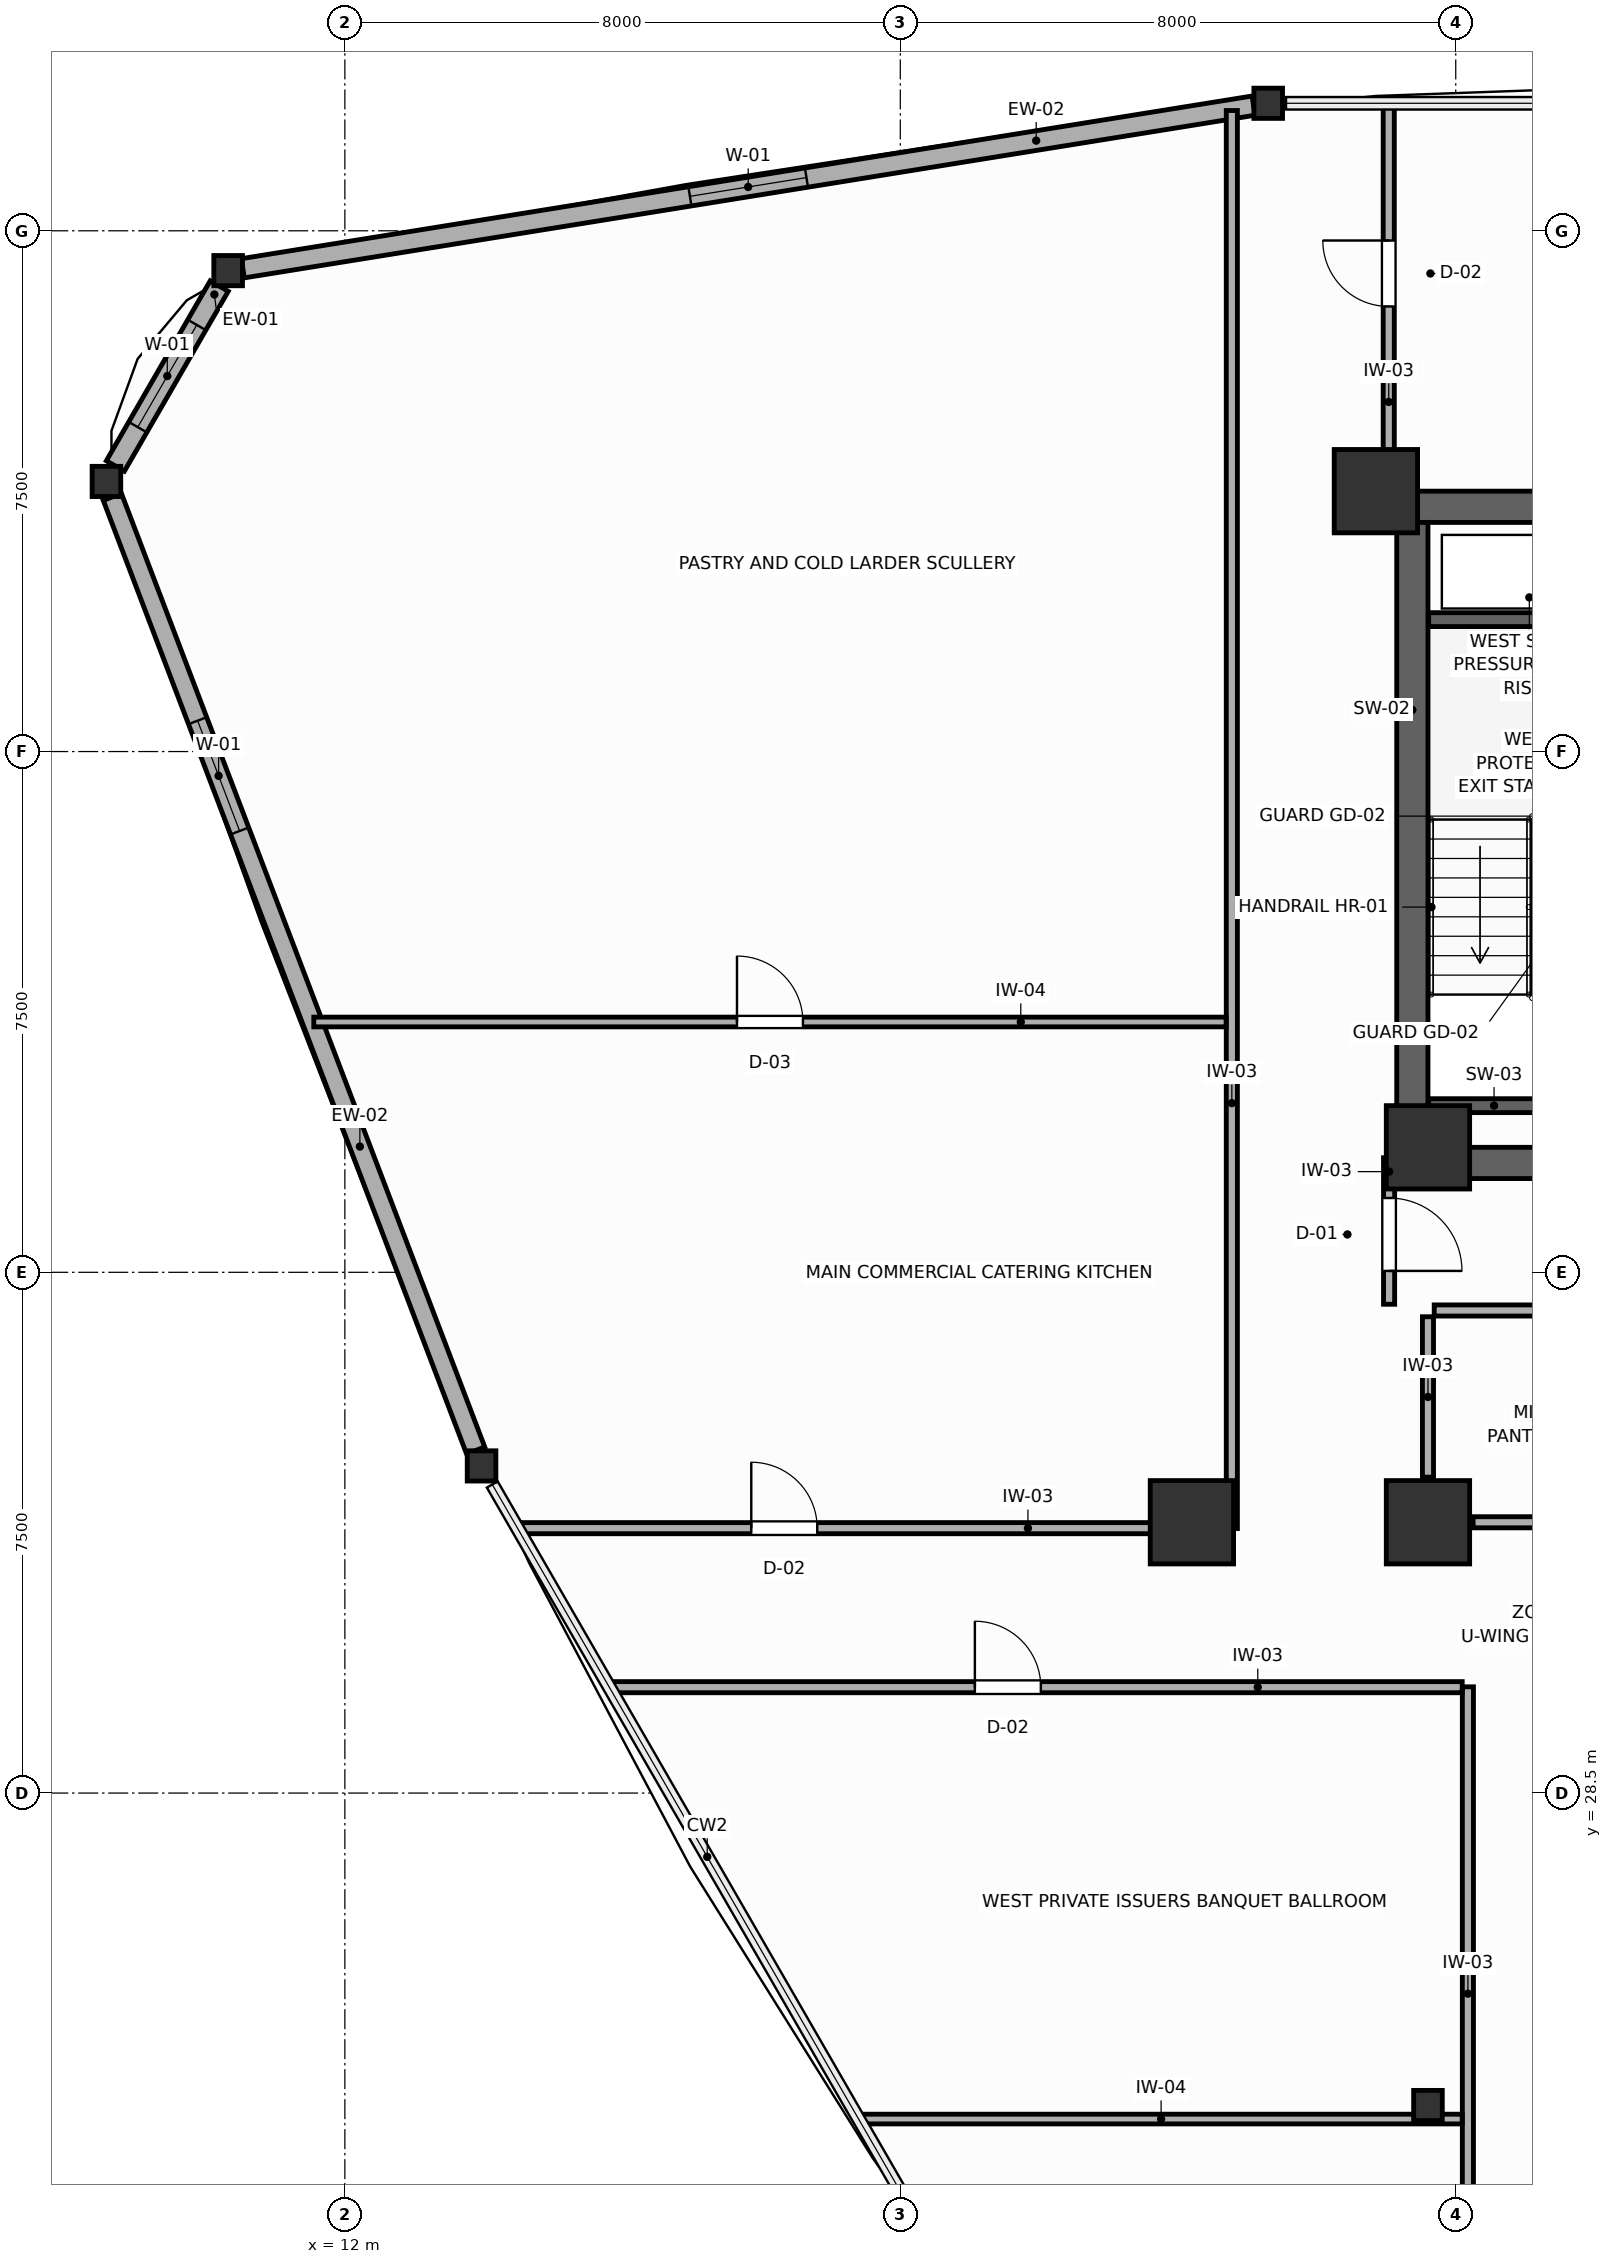
"""IFC4 building model, lengths in metres.
Left out: names, types, materials, properties, quantities, classifications, styles, units other than length and angle.
Written with IfcOpenShell. Run it as: python <this file> out.ifc"""

import sys

from ifc_helpers import new_model, si_unit, direction, frame, frame_2d, origin, origin_2d, place, context, subcontext, project, spatial, rectangle, i_section, extrude, source, transform, mapped, element, fill, save


model = new_model("IFC4")
c1 = context("Model", 3, precision=1e-05, world=origin(), true_north=direction((0.0, 1.0)))
c2 = subcontext(c1, "Body", "Model", "MODEL_VIEW")
j1 = project(units=[si_unit("LENGTHUNIT", "METRE"), si_unit("PLANEANGLEUNIT", "RADIAN")], contexts=[c1])
p1 = place(None, origin())
s1 = spatial("IfcSite", under=j1, at=p1, CompositionType="ELEMENT")
p2 = place(p1, origin())
s2 = spatial("IfcBuilding", under=s1, at=p2, CompositionType="ELEMENT")
p3 = place(p2, frame((0.0, 0.0, 150.6)))
s3 = spatial("IfcBuildingStorey", under=s2, at=p3, CompositionType="ELEMENT", Elevation=150.6)
p4 = place(p3, frame((27.15, 47.025, 0.0), z_axis=(0.0, 0.0, 1.0), x_axis=(1.0, 0.0, 0.0)))
e1 = element("IfcWall", 1, at=p4, inside=s3, PredefinedType="SHEAR", context=c2, shape_type="SweptSolid", body=[
    extrude(rectangle(XDim=17.7, YDim=0.45, at=frame_2d((8.85, 0.0))), origin(), (0.0, 0.0, 1.0), 3.6),
])
p5 = place(p3, frame((27.15, 37.575, 0.0), z_axis=(0.0, 0.0, 1.0), x_axis=(1.0, 0.0, 0.0)))
e2 = element("IfcWall", 2, at=p5, inside=s3, PredefinedType="SHEAR", context=c2, shape_type="SweptSolid", body=[
    extrude(rectangle(XDim=17.7, YDim=0.45, at=frame_2d((8.85, 0.0))), origin(), (0.0, 0.0, 1.0), 3.6),
])
p6 = place(p5, frame((4.875, 0.0, 0.0)))
e3 = element("IfcOpeningElement", 3, at=p6, cuts=e2, PredefinedType="OPENING", context=c2, shape_type="SweptSolid", body=[
    extrude(rectangle(XDim=1.05, YDim=2.1, at=frame_2d((0.525, 1.05))), frame((0.0, 0.235, 0.0), z_axis=(0.0, -1.0, 0.0), x_axis=(1.0, 0.0, 0.0)), (0.0, 0.0, 1.0), 0.47),
])
p7 = place(p5, frame((11.775, 0.0, 0.0)))
e4 = element("IfcOpeningElement", 4, at=p7, cuts=e2, PredefinedType="OPENING", context=c2, shape_type="SweptSolid", body=[
    extrude(rectangle(XDim=1.05, YDim=2.1, at=frame_2d((0.525, 1.05))), frame((0.0, 0.235, 0.0), z_axis=(0.0, -1.0, 0.0), x_axis=(1.0, 0.0, 0.0)), (0.0, 0.0, 1.0), 0.47),
])
p8 = place(p3, frame((27.375, 37.8, 0.0), z_axis=(0.0, 0.0, 1.0), x_axis=(0.0, 1.0, 0.0)))
e5 = element("IfcWall", 5, at=p8, inside=s3, PredefinedType="SHEAR", context=c2, shape_type="SweptSolid", body=[
    extrude(rectangle(XDim=9.0, YDim=0.45, at=frame_2d((4.5, 0.0))), origin(), (0.0, 0.0, 1.0), 3.6),
])
m1 = source(origin(), c2, "Body", "SweptSolid", [
    extrude(rectangle(XDim=1.2, YDim=1.2, at=origin_2d()), origin(), (0.0, 0.0, 1.0), 3.6),
])
for number, where, z_axis, x_axis in (
    (6, (26.85, 47.25, 0.0), (0.0, 0.0, 1.0), (1.0, 0.0, 0.0)),
    (7, (27.6, 37.8, 0.0), (0.0, 0.0, 1.0), (1.0, 0.0, 0.0)),
    (8, (27.6, 32.4, 0.0), (0.0, 0.0, 1.0), (1.0, 0.0, 0.0)),
    (9, (24.2, 32.4, 0.0), (0.0, 0.0, 1.0), (1.0, 0.0, 0.0)),
):
    element("IfcColumn", number, at=place(p3, frame(where, z_axis=z_axis, x_axis=x_axis)), inside=s3, PredefinedType="COLUMN", context=c2, shape_type="MappedRepresentation", body=[
        mapped(m1, transform((0.0, 0.0, 0.0), scale=1.0)),
    ])
m2 = source(origin(), c2, "Body", "SweptSolid", [
    extrude(i_section(OverallWidth=0.412, OverallDepth=0.435, WebThickness=0.033, FlangeThickness=0.053, FilletRadius=0.015, at=origin_2d()), origin(), (0.0, 0.0, 1.0), 3.6),
])
for number, where, z_axis, x_axis in (
    (10, (27.6, 24.0, 0.0), (0.0, 0.0, 1.0), (1.0, 0.0, 0.0)),
    (11, (25.299, 52.836, 0.0), (0.0, 0.0, 1.0), (1.0, 0.0, 0.0)),
    (12, (10.319, 50.426, 0.0), (0.0, 0.0, 1.0), (1.0, 0.0, 0.0)),
    (13, (8.566, 47.39, 0.0), (0.0, 0.0, 1.0), (1.0, 0.0, 0.0)),
    (14, (13.969, 33.212, 0.0), (0.0, 0.0, 1.0), (1.0, 0.0, 0.0)),
):
    element("IfcColumn", number, at=place(p3, frame(where, z_axis=z_axis, x_axis=x_axis)), inside=s3, PredefinedType="COLUMN", context=c2, shape_type="MappedRepresentation", body=[
        mapped(m2, transform((0.0, 0.0, 0.0), scale=1.0)),
    ])
p9 = place(p3, frame((25.088, 52.802, 0.0), z_axis=(0.0, 0.0, 1.0), x_axis=(-0.987303259595, -0.158846698404, 0.0)))
e15 = element("IfcWall", 15, at=p9, inside=s3, PredefinedType="SOLIDWALL", context=c2, shape_type="SweptSolid", body=[
    extrude(rectangle(XDim=14.746, YDim=0.28, at=frame_2d((7.373, 0.0))), origin(), (0.0, 0.0, 1.0), 2.95),
])
p10 = place(p9, frame((6.523, 0.0, 0.75)))
e16 = element("IfcOpeningElement", 16, at=p10, cuts=e15, PredefinedType="OPENING", context=c2, shape_type="SweptSolid", body=[
    extrude(rectangle(XDim=1.7, YDim=1.75, at=frame_2d((0.85, 0.875))), frame((0.0, 0.15, 0.0), z_axis=(0.0, -1.0, 0.0), x_axis=(1.0, 0.0, 0.0)), (0.0, 0.0, 1.0), 0.3),
])
p11 = place(p3, frame((10.19, 50.204, 0.0), z_axis=(0.0, 0.0, 1.0), x_axis=(-0.499974392705, -0.866040187658, 0.0)))
e17 = element("IfcWall", 17, at=p11, inside=s3, PredefinedType="SOLIDWALL", context=c2, shape_type="SweptSolid", body=[
    extrude(rectangle(XDim=2.992, YDim=0.3, at=frame_2d((1.496, 0.0))), origin(), (0.0, 0.0, 1.0), 3.0),
])
p12 = place(p11, frame((0.646, 0.0, 0.75)))
e18 = element("IfcOpeningElement", 18, at=p12, cuts=e17, PredefinedType="OPENING", context=c2, shape_type="SweptSolid", body=[
    extrude(rectangle(XDim=1.7, YDim=1.75, at=frame_2d((0.85, 0.875))), frame((0.0, 0.16, 0.0), z_axis=(0.0, -1.0, 0.0), x_axis=(1.0, 0.0, 0.0)), (0.0, 0.0, 1.0), 0.32),
])
p13 = place(p3, frame((8.651, 47.167, 0.0), z_axis=(0.0, 0.0, 1.0), x_axis=(0.356077530784, -0.934456415287, 0.0)))
e19 = element("IfcWall", 19, at=p13, inside=s3, PredefinedType="SOLIDWALL", context=c2, shape_type="SweptSolid", body=[
    extrude(rectangle(XDim=14.697, YDim=0.28, at=frame_2d((7.348, 0.0))), origin(), (0.0, 0.0, 1.0), 2.95),
])
p14 = place(p13, frame((3.449, 0.0, 0.75)))
e20 = element("IfcOpeningElement", 20, at=p14, cuts=e19, PredefinedType="OPENING", context=c2, shape_type="SweptSolid", body=[
    extrude(rectangle(XDim=1.7, YDim=1.75, at=frame_2d((0.85, 0.875))), frame((0.0, 0.15, 0.0), z_axis=(0.0, -1.0, 0.0), x_axis=(1.0, 0.0, 0.0)), (0.0, 0.0, 1.0), 0.3),
])
for number, where, z_axis, x_axis in (
    (21, (27.61, 45.4, 0.0), (0.0, 0.0, 1.0), (1.0, 0.0, 0.0)),
    (22, (27.61, 38.4, 0.0), (0.0, 0.0, 1.0), (1.0, 0.0, 0.0)),
):
    element("IfcWall", number, at=place(p3, frame(where, z_axis=z_axis, x_axis=x_axis)), inside=s3, PredefinedType="SHEAR", context=c2, shape_type="SweptSolid", body=[
        extrude(rectangle(XDim=3.14, YDim=0.2, at=frame_2d((1.57, 0.0))), origin(), (0.0, 0.0, 1.0), 3.6),
    ])
p15 = place(p3, frame((28.25, 32.4, 0.0), z_axis=(0.0, 0.0, 1.0), x_axis=(1.0, 0.0, 0.0)))
e23 = element("IfcWall", 23, at=p15, inside=s3, PredefinedType="PARTITIONING", context=c2, shape_type="SweptSolid", body=[
    extrude(rectangle(XDim=3.45, YDim=0.16, at=frame_2d((1.725, 0.0))), origin(), (0.0, 0.0, 1.0), 2.95),
])
p16 = place(p3, frame((27.6, 33.05, 0.0), z_axis=(0.0, 0.0, 1.0), x_axis=(0.0, 1.0, 0.0)))
e24 = element("IfcWall", 24, at=p16, inside=s3, PredefinedType="PARTITIONING", context=c2, shape_type="SweptSolid", body=[
    extrude(rectangle(XDim=2.31, YDim=0.16, at=frame_2d((1.155, 0.0))), origin(), (0.0, 0.0, 1.0), 3.4),
])
p17 = place(p3, frame((27.69, 35.45, 0.0), z_axis=(0.0, 0.0, 1.0), x_axis=(1.0, 0.0, 0.0)))
e25 = element("IfcWall", 25, at=p17, inside=s3, PredefinedType="PARTITIONING", context=c2, shape_type="SweptSolid", body=[
    extrude(rectangle(XDim=4.01, YDim=0.16, at=frame_2d((2.005, 0.0))), origin(), (0.0, 0.0, 1.0), 3.4),
])
p18 = place(p17, frame((1.45, 0.0, 0.0)))
e26 = element("IfcOpeningElement", 26, at=p18, cuts=e25, PredefinedType="OPENING", context=c2, shape_type="SweptSolid", body=[
    extrude(rectangle(XDim=0.95, YDim=2.05, at=frame_2d((0.475, 1.025))), frame((0.0, 0.09, 0.0), z_axis=(0.0, -1.0, 0.0), x_axis=(1.0, 0.0, 0.0)), (0.0, 0.0, 1.0), 0.18),
])
p19 = place(p3, frame((27.04, 35.54, 0.0), z_axis=(0.0, 0.0, 1.0), x_axis=(0.0, 1.0, 0.0)))
e27 = element("IfcWall", 27, at=p19, inside=s3, PredefinedType="PARTITIONING", context=c2, shape_type="SweptSolid", body=[
    extrude(rectangle(XDim=2.11, YDim=0.16, at=frame_2d((1.055, 0.0))), origin(), (0.0, 0.0, 1.0), 3.4),
])
p20 = place(p19, frame((0.48, 0.0, 0.0)))
e28 = element("IfcOpeningElement", 28, at=p20, cuts=e27, PredefinedType="OPENING", context=c2, shape_type="SweptSolid", body=[
    extrude(rectangle(XDim=1.05, YDim=2.1, at=frame_2d((0.525, 1.05))), frame((0.0, 0.09, 0.0), z_axis=(0.0, -1.0, 0.0), x_axis=(1.0, 0.0, 0.0)), (0.0, 0.0, 1.0), 0.18),
])
p21 = place(p3, frame((24.775, 32.31, 0.0), z_axis=(0.0, 0.0, 1.0), x_axis=(0.0, 1.0, 0.0)))
e29 = element("IfcWall", 29, at=p21, inside=s3, PredefinedType="PARTITIONING", context=c2, shape_type="SweptSolid", body=[
    extrude(rectangle(XDim=20.422, YDim=0.16, at=frame_2d((10.211, 0.0))), origin(), (0.0, 0.0, 1.0), 3.4),
])
p22 = place(p3, frame((28.175, 12.504, 0.0), z_axis=(0.0, 0.0, 1.0), x_axis=(0.0, 1.0, 0.0)))
e30 = element("IfcWall", 30, at=p22, inside=s3, PredefinedType="PARTITIONING", context=c2, shape_type="SweptSolid", body=[
    extrude(rectangle(XDim=17.526, YDim=0.16, at=frame_2d((8.763, 0.0))), origin(), (0.0, 0.0, 1.0), 2.95),
])
p23 = place(p22, frame((7.557, 0.0, 0.0)))
e31 = element("IfcOpeningElement", 31, at=p23, cuts=e30, PredefinedType="OPENING", context=c2, shape_type="SweptSolid", body=[
    extrude(rectangle(XDim=0.95, YDim=2.05, at=frame_2d((0.475, 1.025))), frame((0.0, 0.09, 0.0), z_axis=(0.0, -1.0, 0.0), x_axis=(1.0, 0.0, 0.0)), (0.0, 0.0, 1.0), 0.18),
])
p24 = place(p3, frame((15.829, 30.025, 0.0), z_axis=(0.0, 0.0, 1.0), x_axis=(1.0, 0.0, 0.0)))
e32 = element("IfcWall", 32, at=p24, inside=s3, PredefinedType="PARTITIONING", context=c2, shape_type="SweptSolid", body=[
    extrude(rectangle(XDim=12.264, YDim=0.16, at=frame_2d((6.132, 0.0))), origin(), (0.0, 0.0, 1.0), 3.4),
])
p25 = place(p24, frame((5.245, 0.0, 0.0)))
e33 = element("IfcOpeningElement", 33, at=p25, cuts=e32, PredefinedType="OPENING", context=c2, shape_type="SweptSolid", body=[
    extrude(rectangle(XDim=0.95, YDim=2.05, at=frame_2d((0.475, 1.025))), frame((0.0, 0.09, 0.0), z_axis=(0.0, -1.0, 0.0), x_axis=(1.0, 0.0, 0.0)), (0.0, 0.0, 1.0), 0.18),
])
p26 = place(p3, frame((14.507, 32.315, 0.0), z_axis=(0.0, 0.0, 1.0), x_axis=(1.0, 0.0, 0.0)))
e34 = element("IfcWall", 34, at=p26, inside=s3, PredefinedType="PARTITIONING", context=c2, shape_type="SweptSolid", body=[
    extrude(rectangle(XDim=10.187, YDim=0.16, at=frame_2d((5.093, 0.0))), origin(), (0.0, 0.0, 1.0), 2.95),
])
p27 = place(p26, frame((3.347, 0.0, 0.0)))
e35 = element("IfcOpeningElement", 35, at=p27, cuts=e34, PredefinedType="OPENING", context=c2, shape_type="SweptSolid", body=[
    extrude(rectangle(XDim=0.95, YDim=2.05, at=frame_2d((0.475, 1.025))), frame((0.0, 0.09, 0.0), z_axis=(0.0, -1.0, 0.0), x_axis=(1.0, 0.0, 0.0)), (0.0, 0.0, 1.0), 0.18),
])
p28 = place(p3, frame((27.035, 47.34, 0.0), z_axis=(0.0, 0.0, 1.0), x_axis=(0.0, 1.0, 0.0)))
e36 = element("IfcWall", 36, at=p28, inside=s3, PredefinedType="PARTITIONING", context=c2, shape_type="SweptSolid", body=[
    extrude(rectangle(XDim=5.476, YDim=0.16, at=frame_2d((2.738, 0.0))), origin(), (0.0, 0.0, 1.0), 3.4),
])
p29 = place(p28, frame((2.57, 0.0, 0.0)))
e37 = element("IfcOpeningElement", 37, at=p29, cuts=e36, PredefinedType="OPENING", context=c2, shape_type="SweptSolid", body=[
    extrude(rectangle(XDim=0.95, YDim=2.05, at=frame_2d((0.475, 1.025))), frame((0.0, 0.09, 0.0), z_axis=(0.0, -1.0, 0.0), x_axis=(1.0, 0.0, 0.0)), (0.0, 0.0, 1.0), 0.18),
])
p30 = place(p3, frame((11.552, 39.605, 0.0), z_axis=(0.0, 0.0, 1.0), x_axis=(1.0, 0.0, 0.0)))
e38 = element("IfcWall", 38, at=p30, inside=s3, PredefinedType="PARTITIONING", context=c2, shape_type="SweptSolid", body=[
    extrude(rectangle(XDim=13.141, YDim=0.14, at=frame_2d((6.57, 0.0))), origin(), (0.0, 0.0, 1.0), 3.4),
])
p31 = place(p30, frame((6.095, 0.0, 0.0)))
e39 = element("IfcOpeningElement", 39, at=p31, cuts=e38, PredefinedType="OPENING", context=c2, shape_type="SweptSolid", body=[
    extrude(rectangle(XDim=0.95, YDim=2.05, at=frame_2d((0.475, 1.025))), frame((0.0, 0.08, 0.0), z_axis=(0.0, -1.0, 0.0), x_axis=(1.0, 0.0, 0.0)), (0.0, 0.0, 1.0), 0.16),
])
p32 = place(p3, frame((19.42, 23.805, 0.0), z_axis=(0.0, 0.0, 1.0), x_axis=(1.0, 0.0, 0.0)))
e40 = element("IfcWall", 40, at=p32, inside=s3, PredefinedType="PARTITIONING", context=c2, shape_type="SweptSolid", body=[
    extrude(rectangle(XDim=8.673, YDim=0.14, at=frame_2d((4.337, 0.0))), origin(), (0.0, 0.0, 1.0), 2.95),
])
p33 = place(p10, origin())
e41 = element("IfcWindow", 41, at=p33, inside=s3, PartitioningType="SINGLE_PANEL", PredefinedType="WINDOW", context=c2, shape_type="SweptSolid", body=[
    extrude(rectangle(XDim=1.7, YDim=1.75, at=frame_2d((0.85, 0.875))), frame((0.0, 0.03, 0.0), z_axis=(0.0, -1.0, 0.0), x_axis=(1.0, 0.0, 0.0)), (0.0, 0.0, 1.0), 0.06),
])
fill(e16, e41)
p34 = place(p12, origin())
e42 = element("IfcWindow", 42, at=p34, inside=s3, PartitioningType="SINGLE_PANEL", PredefinedType="WINDOW", context=c2, shape_type="SweptSolid", body=[
    extrude(rectangle(XDim=1.7, YDim=1.75, at=frame_2d((0.85, 0.875))), frame((0.0, 0.03, 0.0), z_axis=(0.0, -1.0, 0.0), x_axis=(1.0, 0.0, 0.0)), (0.0, 0.0, 1.0), 0.06),
])
fill(e18, e42)
p35 = place(p14, origin())
e43 = element("IfcWindow", 43, at=p35, inside=s3, PartitioningType="SINGLE_PANEL", PredefinedType="WINDOW", context=c2, shape_type="SweptSolid", body=[
    extrude(rectangle(XDim=1.7, YDim=1.75, at=frame_2d((0.85, 0.875))), frame((0.0, 0.03, 0.0), z_axis=(0.0, -1.0, 0.0), x_axis=(1.0, 0.0, 0.0)), (0.0, 0.0, 1.0), 0.06),
])
fill(e20, e43)
p36 = place(p20, frame((1.05, 0.0, 0.0), z_axis=(0.0, 0.0, 1.0), x_axis=(-1.0, 0.0, 0.0)))
e44 = element("IfcDoor", 44, at=p36, inside=s3, OperationType="SINGLE_SWING_RIGHT", PredefinedType="DOOR", context=c2, shape_type="SweptSolid", body=[
    extrude(rectangle(XDim=1.05, YDim=2.1, at=frame_2d((0.525, 1.05))), frame((0.0, 0.025, 0.0), z_axis=(0.0, -1.0, 0.0), x_axis=(1.0, 0.0, 0.0)), (0.0, 0.0, 1.0), 0.05),
])
fill(e28, e44)
p37 = place(p25, origin())
e45 = element("IfcDoor", 45, at=p37, inside=s3, OperationType="SINGLE_SWING_LEFT", PredefinedType="DOOR", context=c2, shape_type="SweptSolid", body=[
    extrude(rectangle(XDim=0.95, YDim=2.05, at=frame_2d((0.475, 1.025))), frame((0.0, 0.025, 0.0), z_axis=(0.0, -1.0, 0.0), x_axis=(1.0, 0.0, 0.0)), (0.0, 0.0, 1.0), 0.05),
])
fill(e33, e45)
p38 = place(p27, origin())
e46 = element("IfcDoor", 46, at=p38, inside=s3, OperationType="SINGLE_SWING_LEFT", PredefinedType="DOOR", context=c2, shape_type="SweptSolid", body=[
    extrude(rectangle(XDim=0.95, YDim=2.05, at=frame_2d((0.475, 1.025))), frame((0.0, 0.025, 0.0), z_axis=(0.0, -1.0, 0.0), x_axis=(1.0, 0.0, 0.0)), (0.0, 0.0, 1.0), 0.05),
])
fill(e35, e46)
p39 = place(p29, origin())
e47 = element("IfcDoor", 47, at=p39, inside=s3, OperationType="SINGLE_SWING_RIGHT", PredefinedType="DOOR", context=c2, shape_type="SweptSolid", body=[
    extrude(rectangle(XDim=0.95, YDim=2.05, at=frame_2d((0.475, 1.025))), frame((0.0, 0.025, 0.0), z_axis=(0.0, -1.0, 0.0), x_axis=(1.0, 0.0, 0.0)), (0.0, 0.0, 1.0), 0.05),
])
fill(e37, e47)
p40 = place(p31, origin())
e48 = element("IfcDoor", 48, at=p40, inside=s3, OperationType="SINGLE_SWING_LEFT", PredefinedType="DOOR", context=c2, shape_type="SweptSolid", body=[
    extrude(rectangle(XDim=0.95, YDim=2.05, at=frame_2d((0.475, 1.025))), frame((0.0, 0.025, 0.0), z_axis=(0.0, -1.0, 0.0), x_axis=(1.0, 0.0, 0.0)), (0.0, 0.0, 1.0), 0.05),
])
fill(e39, e48)
save(model, sys.argv[1])
